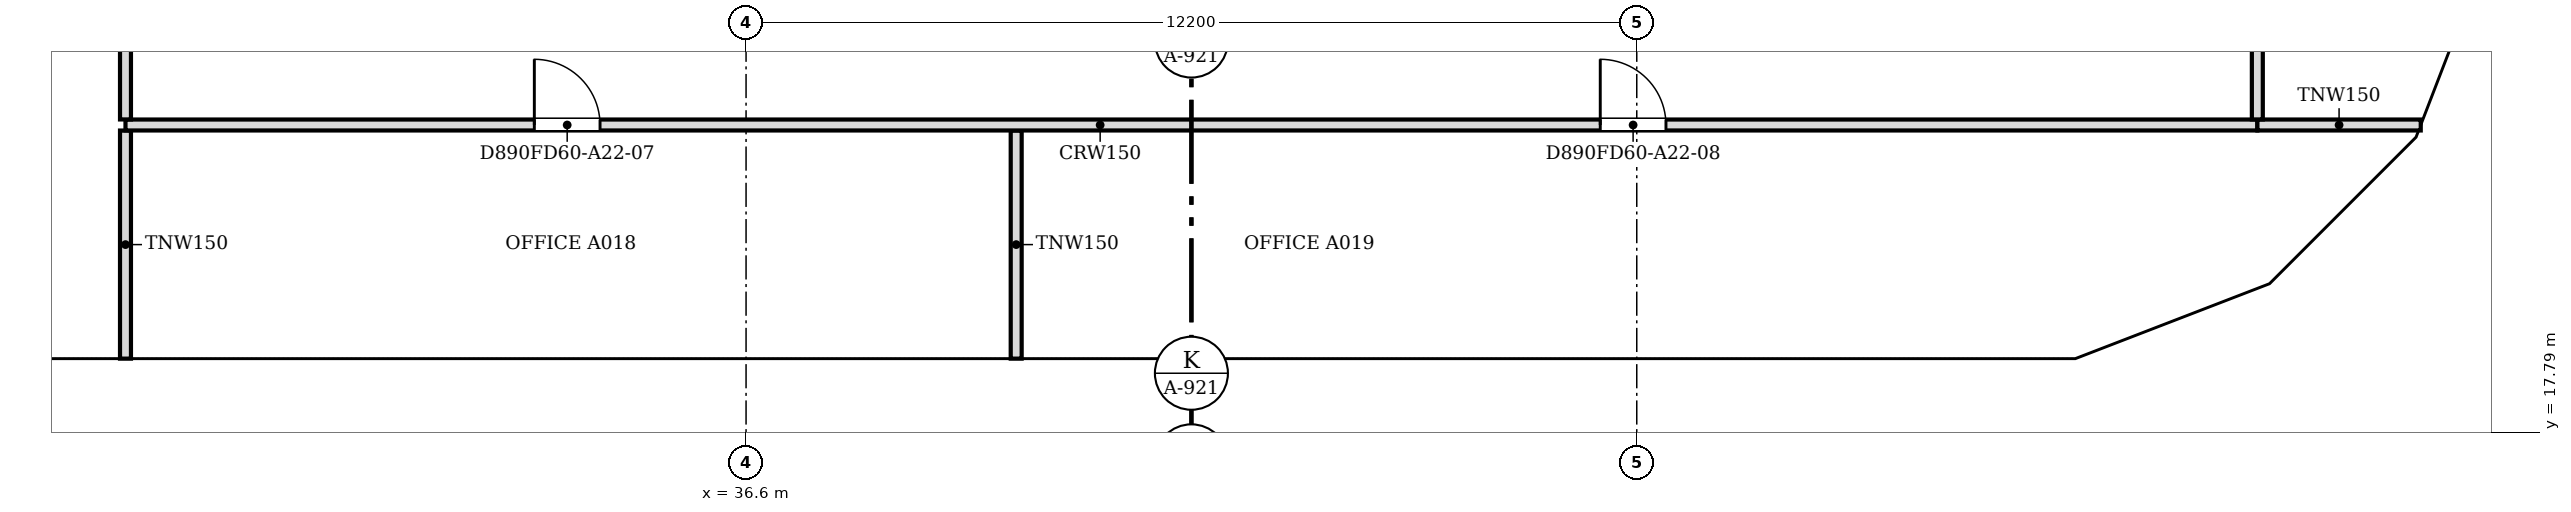
"""IFC4 building model, lengths in metres.
Left out: names, types, materials, properties, quantities, classifications, styles, units other than length and angle.
Written with IfcOpenShell. Run it as: python <this file> out.ifc"""

import sys

from ifc_helpers import new_model, si_unit, direction, frame, frame_2d, origin, place, context, subcontext, project, spatial, polyline, rectangle, outline, extrude, faceted_brep, source, transform, mapped, element, fill, save


model = new_model("IFC4")
c1 = context("Model", 3, precision=1e-05, world=origin(), true_north=direction((0.0, 1.0)))
c2 = subcontext(c1, "Body", "Model", "MODEL_VIEW")
j1 = project(units=[si_unit("LENGTHUNIT", "METRE"), si_unit("PLANEANGLEUNIT", "RADIAN")], contexts=[c1])
p1 = place(None, origin())
s1 = spatial("IfcSite", under=j1, at=p1, CompositionType="ELEMENT")
p2 = place(p1, origin())
s2 = spatial("IfcBuilding", under=s1, at=p2, CompositionType="ELEMENT")
p3 = place(p2, frame((0.0, 0.0, 255.9)))
s3 = spatial("IfcBuildingStorey", under=s2, at=p3, CompositionType="ELEMENT", Elevation=255.9)
m1 = source(origin(), c2, "Body", "SweptSolid", [
    extrude(outline(polyline([(3.05, 0.0), (6.1, 3.8), (3.05, 7.6), (0.0, 3.8), (3.05, 0.0)])), frame((0.0, 0.25, 0.0), z_axis=(0.0, -1.0, 0.0), x_axis=(1.0, 0.0, 0.0)), (0.0, 0.0, 1.0), 0.5),
])
p4 = place(p3, frame((24.4, 18.55, -3.8), z_axis=(0.0, 0.0, 1.0), x_axis=(1.0, 0.0, 0.0)))
e1 = element("IfcWall", 1, at=p4, inside=s3, PredefinedType="SOLIDWALL", context=c2, shape_type="MappedRepresentation", body=[
    mapped(m1, transform((0.0, 0.0, 0.0), scale=1.0)),
])
m2 = source(origin(), c2, "Body", "SweptSolid", [
    extrude(outline(polyline([(3.05, 0.399), (5.78, 3.8), (3.05, 7.2), (0.321, 3.8), (3.05, 0.399)])), frame((0.0, 0.26, 0.0), z_axis=(0.0, -1.0, 0.0), x_axis=(1.0, 0.0, 0.0)), (0.0, 0.0, 1.0), 0.52),
])
p5 = place(p4, origin())
e2 = element("IfcOpeningElement", 2, at=p5, cuts=e1, PredefinedType="OPENING", context=c2, shape_type="MappedRepresentation", body=[
    mapped(m2, transform((0.0, 0.0, 0.0), scale=1.0)),
])
p6 = place(p3, frame((30.5, 18.55, -3.8), z_axis=(0.0, 0.0, 1.0), x_axis=(1.0, 0.0, 0.0)))
e3 = element("IfcWall", 3, at=p6, inside=s3, PredefinedType="SOLIDWALL", context=c2, shape_type="MappedRepresentation", body=[
    mapped(m1, transform((0.0, 0.0, 0.0), scale=1.0)),
])
p7 = place(p6, origin())
e4 = element("IfcOpeningElement", 4, at=p7, cuts=e3, PredefinedType="OPENING", context=c2, shape_type="MappedRepresentation", body=[
    mapped(m2, transform((0.0, 0.0, 0.0), scale=1.0)),
])
m3 = source(origin(), c2, "Body", "Brep", [
    faceted_brep([(3.05, -0.25, 0.0), (6.1, -0.25, 3.8), (6.1, -0.25, 3.8), (3.05, -0.25, 7.6), (0.0, -0.25, 3.8), (0.0, 0.25, 3.8), (3.05, 0.25, 7.6), (6.1, 0.25, 3.8), (6.1, 0.25, 3.8), (3.05, 0.25, 0.0)], [[[0, 1, 2, 3, 4]], [[5, 6, 7, 8, 9]], [[9, 8, 1, 0]], [[7, 6, 3, 2]], [[6, 5, 4, 3]], [[5, 9, 0, 4]], [[1, 8, 7, 2]]]),
])
p8 = place(p3, frame((36.6, 18.55, -3.8), z_axis=(0.0, 0.0, 1.0), x_axis=(1.0, 0.0, 0.0)))
e5 = element("IfcWall", 5, at=p8, inside=s3, PredefinedType="SOLIDWALL", context=c2, shape_type="MappedRepresentation", body=[
    mapped(m3, transform((0.0, 0.0, 0.0), scale=1.0)),
])
p9 = place(p8, origin())
e6 = element("IfcOpeningElement", 6, at=p9, cuts=e5, PredefinedType="OPENING", context=c2, shape_type="MappedRepresentation", body=[
    mapped(m2, transform((0.0, 0.0, 0.0), scale=1.0)),
])
p10 = place(p3, frame((42.7, 18.55, -3.8), z_axis=(0.0, 0.0, 1.0), x_axis=(1.0, 0.0, 0.0)))
e7 = element("IfcWall", 7, at=p10, inside=s3, PredefinedType="SOLIDWALL", context=c2, shape_type="MappedRepresentation", body=[
    mapped(m1, transform((0.0, 0.0, 0.0), scale=1.0)),
])
p11 = place(p10, origin())
e8 = element("IfcOpeningElement", 8, at=p11, cuts=e7, PredefinedType="OPENING", context=c2, shape_type="MappedRepresentation", body=[
    mapped(m2, transform((0.0, 0.0, 0.0), scale=1.0)),
])
m4 = source(origin(), c2, "Body", "Brep", [
    faceted_brep([(3.05, -0.25, 0.0), (6.053, -0.25, 3.8), (3.05, -0.25, 7.6), (0.0, -0.25, 3.8), (0.0, 0.25, 3.8), (3.05, 0.25, 7.6), (6.007, 0.25, 3.859), (6.007, 0.25, 3.741), (3.05, 0.25, 0.0), (6.053, 0.0, 3.8)], [[[0, 1, 2, 3]], [[4, 5, 6, 7, 8]], [[8, 7, 9, 1, 0]], [[6, 5, 2, 1, 9]], [[5, 4, 3, 2]], [[4, 8, 0, 3]], [[9, 7, 6]]]),
])
p12 = place(p3, frame((48.8, 18.55, -3.8), z_axis=(0.0, 0.0, 1.0), x_axis=(1.0, 0.0, 0.0)))
e9 = element("IfcWall", 9, at=p12, inside=s3, PredefinedType="SOLIDWALL", context=c2, shape_type="MappedRepresentation", body=[
    mapped(m4, transform((0.0, 0.0, 0.0), scale=1.0)),
])
m5 = source(origin(), c2, "Body", "SweptSolid", [
    extrude(outline(polyline([(3.049, 0.401), (5.735, 3.8), (3.049, 7.199), (0.321, 3.8), (3.049, 0.401)])), frame((0.0, 0.26, 0.0), z_axis=(0.0, -1.0, 0.0), x_axis=(1.0, 0.0, 0.0)), (0.0, 0.0, 1.0), 0.52),
])
p13 = place(p12, origin())
e10 = element("IfcOpeningElement", 10, at=p13, cuts=e9, PredefinedType="OPENING", context=c2, shape_type="MappedRepresentation", body=[
    mapped(m5, transform((0.0, 0.0, 0.0), scale=1.0)),
])
m6 = source(origin(), c2, "Body", "Brep", [
    faceted_brep([(2.95, -0.25, 0.0), (3.003, -0.25, 0.068), (3.003, -0.25, 7.531), (2.95, -0.25, 7.6), (0.0, -0.25, 3.8), (0.047, 0.25, 3.86), (2.898, 0.25, 7.532), (2.898, 0.25, 0.068), (0.047, 0.25, 3.74), (2.95, 0.0, 0.0), (2.95, 0.0, 7.6), (0.0, 0.0, 3.8)], [[[0, 1, 2, 3, 4]], [[5, 6, 7, 8]], [[1, 0, 9]], [[10, 3, 2]], [[6, 5, 11, 4, 3, 10]], [[8, 7, 9, 0, 4, 11]], [[8, 11, 5]], [[1, 9, 7, 6, 10, 2]]]),
])
p14 = place(p3, frame((54.854, 18.55, -3.8), z_axis=(0.0, 0.0, 1.0), x_axis=(0.932997369089, 0.359883188373, 0.0)))
e11 = element("IfcWall", 11, at=p14, inside=s3, PredefinedType="SOLIDWALL", context=c2, shape_type="MappedRepresentation", body=[
    mapped(m6, transform((0.0, 0.0, 0.0), scale=1.0)),
])
m7 = source(origin(), c2, "Body", "SweptSolid", [
    extrude(outline(polyline([(2.75, 6.935), (0.316, 3.8), (2.75, 0.665), (2.75, 6.935)])), frame((0.0, 0.26, 0.0), z_axis=(0.0, -1.0, 0.0), x_axis=(1.0, 0.0, 0.0)), (0.0, 0.0, 1.0), 0.52),
])
p15 = place(p14, origin())
e12 = element("IfcOpeningElement", 12, at=p15, cuts=e11, PredefinedType="OPENING", context=c2, shape_type="MappedRepresentation", body=[
    mapped(m7, transform((0.0, 0.0, 0.0), scale=1.0)),
])
m8 = source(origin(), c2, "Body", "Brep", [
    faceted_brep([(0.053, -0.25, 0.0), (2.997, -0.25, 3.8), (0.053, -0.25, 7.6), (0.0, -0.25, 7.532), (0.0, -0.25, 0.068), (0.106, 0.25, 7.531), (2.944, 0.25, 3.868), (2.944, 0.25, 3.732), (0.106, 0.25, 0.068), (2.997, 0.0, 3.8), (0.053, 0.0, 0.0), (0.053, 0.0, 7.6)], [[[0, 1, 2, 3, 4]], [[5, 6, 7, 8]], [[8, 7, 9, 1, 0, 10]], [[6, 5, 11, 2, 1, 9]], [[3, 2, 11]], [[10, 0, 4]], [[8, 10, 4, 3, 11, 5]], [[9, 7, 6]]]),
])
p16 = place(p3, frame((57.569, 19.574, -3.8), z_axis=(0.0, 0.0, 1.0), x_axis=(0.707106781187, 0.707106781187, 0.0)))
e13 = element("IfcWall", 13, at=p16, inside=s3, PredefinedType="SOLIDWALL", context=c2, shape_type="MappedRepresentation", body=[
    mapped(m8, transform((0.0, 0.0, 0.0), scale=1.0)),
])
m9 = source(origin(), c2, "Body", "SweptSolid", [
    extrude(outline(polyline([(0.253, 0.666), (2.681, 3.8), (0.253, 6.934), (0.253, 0.666)])), frame((0.0, 0.26, 0.0), z_axis=(0.0, -1.0, 0.0), x_axis=(1.0, 0.0, 0.0)), (0.0, 0.0, 1.0), 0.52),
])
p17 = place(p16, origin())
e14 = element("IfcOpeningElement", 14, at=p17, cuts=e13, PredefinedType="OPENING", context=c2, shape_type="MappedRepresentation", body=[
    mapped(m9, transform((0.0, 0.0, 0.0), scale=1.0)),
])
m10 = source(origin(), c2, "Body", "Brep", [
    faceted_brep([(2.95, -0.25, 0.0), (2.997, -0.25, 0.059), (2.997, -0.25, 7.541), (2.95, -0.25, 7.6), (0.0, -0.25, 3.8), (0.053, 0.25, 3.868), (2.904, 0.25, 7.54), (2.904, 0.25, 0.06), (0.053, 0.25, 3.732), (2.95, 0.0, 0.0), (2.95, 0.0, 7.6), (0.0, 0.0, 3.8)], [[[0, 1, 2, 3, 4]], [[5, 6, 7, 8]], [[1, 0, 9]], [[10, 3, 2]], [[6, 5, 11, 4, 3, 10]], [[8, 7, 9, 0, 4, 11]], [[8, 11, 5]], [[1, 9, 7, 6, 10, 2]]]),
])
p18 = place(p3, frame((59.688, 21.694, -3.8), z_axis=(0.0, 0.0, 1.0), x_axis=(0.359972353723, 0.932962970624, 0.0)))
e15 = element("IfcWall", 15, at=p18, inside=s3, PredefinedType="SOLIDWALL", context=c2, shape_type="MappedRepresentation", body=[
    mapped(m10, transform((0.0, 0.0, 0.0), scale=1.0)),
])
p19 = place(p18, origin())
e16 = element("IfcOpeningElement", 16, at=p19, cuts=e15, PredefinedType="OPENING", context=c2, shape_type="MappedRepresentation", body=[
    mapped(m7, transform((0.0, 0.0, 0.0), scale=1.0)),
])
m11 = source(origin(), c2, "Body", "Brep", [
    faceted_brep([(3.05, -0.25, 0.0), (6.1, -0.25, 3.8), (6.1, -0.25, 3.8), (0.0, -0.25, 3.8), (0.0, 0.25, 3.8), (6.1, 0.25, 3.8), (6.1, 0.25, 3.8), (3.05, 0.25, 0.0)], [[[0, 1, 2, 3]], [[4, 5, 6, 7]], [[7, 6, 1, 0]], [[5, 4, 3, 2]], [[4, 7, 0, 3]], [[1, 6, 5, 2]]]),
])
p20 = place(p3, frame((21.35, 18.55, 0.0), z_axis=(0.0, 0.0, 1.0), x_axis=(1.0, 0.0, 0.0)))
e17 = element("IfcWall", 17, at=p20, inside=s3, PredefinedType="SOLIDWALL", context=c2, shape_type="MappedRepresentation", body=[
    mapped(m11, transform((0.0, 0.0, 0.0), scale=1.0)),
])
m12 = source(origin(), c2, "Body", "SweptSolid", [
    extrude(outline(polyline([(3.05, 0.399), (5.579, 3.55), (0.521, 3.55), (3.05, 0.399)])), frame((0.0, 0.26, 0.0), z_axis=(0.0, -1.0, 0.0), x_axis=(1.0, 0.0, 0.0)), (0.0, 0.0, 1.0), 0.52),
])
p21 = place(p20, origin())
e18 = element("IfcOpeningElement", 18, at=p21, cuts=e17, PredefinedType="OPENING", context=c2, shape_type="MappedRepresentation", body=[
    mapped(m12, transform((0.0, 0.0, 0.0), scale=1.0)),
])
m13 = source(origin(), c2, "Body", "SweptSolid", [
    extrude(outline(polyline([(3.05, 0.0), (6.1, 3.8), (0.0, 3.8), (3.05, 0.0)])), frame((0.0, 0.25, 0.0), z_axis=(0.0, -1.0, 0.0), x_axis=(1.0, 0.0, 0.0)), (0.0, 0.0, 1.0), 0.5),
])
p22 = place(p3, frame((27.45, 18.55, 0.0), z_axis=(0.0, 0.0, 1.0), x_axis=(1.0, 0.0, 0.0)))
e19 = element("IfcWall", 19, at=p22, inside=s3, PredefinedType="SOLIDWALL", context=c2, shape_type="MappedRepresentation", body=[
    mapped(m13, transform((0.0, 0.0, 0.0), scale=1.0)),
])
p23 = place(p22, origin())
e20 = element("IfcOpeningElement", 20, at=p23, cuts=e19, PredefinedType="OPENING", context=c2, shape_type="MappedRepresentation", body=[
    mapped(m12, transform((0.0, 0.0, 0.0), scale=1.0)),
])
p24 = place(p3, frame((33.55, 18.55, 0.0), z_axis=(0.0, 0.0, 1.0), x_axis=(1.0, 0.0, 0.0)))
e21 = element("IfcWall", 21, at=p24, inside=s3, PredefinedType="SOLIDWALL", context=c2, shape_type="MappedRepresentation", body=[
    mapped(m11, transform((0.0, 0.0, 0.0), scale=1.0)),
])
p25 = place(p24, origin())
e22 = element("IfcOpeningElement", 22, at=p25, cuts=e21, PredefinedType="OPENING", context=c2, shape_type="MappedRepresentation", body=[
    mapped(m12, transform((0.0, 0.0, 0.0), scale=1.0)),
])
p26 = place(p3, frame((39.65, 18.55, 0.0), z_axis=(0.0, 0.0, 1.0), x_axis=(1.0, 0.0, 0.0)))
e23 = element("IfcWall", 23, at=p26, inside=s3, PredefinedType="SOLIDWALL", context=c2, shape_type="MappedRepresentation", body=[
    mapped(m13, transform((0.0, 0.0, 0.0), scale=1.0)),
])
p27 = place(p26, origin())
e24 = element("IfcOpeningElement", 24, at=p27, cuts=e23, PredefinedType="OPENING", context=c2, shape_type="MappedRepresentation", body=[
    mapped(m12, transform((0.0, 0.0, 0.0), scale=1.0)),
])
p28 = place(p3, frame((45.75, 18.55, 0.0), z_axis=(0.0, 0.0, 1.0), x_axis=(1.0, 0.0, 0.0)))
e25 = element("IfcWall", 25, at=p28, inside=s3, PredefinedType="SOLIDWALL", context=c2, shape_type="MappedRepresentation", body=[
    mapped(m13, transform((0.0, 0.0, 0.0), scale=1.0)),
])
p29 = place(p28, origin())
e26 = element("IfcOpeningElement", 26, at=p29, cuts=e25, PredefinedType="OPENING", context=c2, shape_type="MappedRepresentation", body=[
    mapped(m12, transform((0.0, 0.0, 0.0), scale=1.0)),
])
m14 = source(origin(), c2, "Body", "Brep", [
    faceted_brep([(3.003, -0.25, 0.0), (3.05, -0.25, 0.06), (3.05, -0.25, 3.8), (0.0, -0.25, 3.8), (0.0, 0.25, 3.8), (2.957, 0.25, 3.8), (2.957, 0.25, 0.059), (3.003, 0.0, 0.0)], [[[0, 1, 2, 3]], [[4, 5, 6]], [[1, 0, 7]], [[5, 4, 3, 2]], [[4, 6, 7, 0, 3]], [[1, 7, 6, 5, 2]]]),
])
p30 = place(p3, frame((51.85, 18.55, 0.0), z_axis=(0.0, 0.0, 1.0), x_axis=(1.0, 0.0, 0.0)))
e27 = element("IfcWall", 27, at=p30, inside=s3, PredefinedType="SOLIDWALL", context=c2, shape_type="MappedRepresentation", body=[
    mapped(m14, transform((0.0, 0.0, 0.0), scale=1.0)),
])
m15 = source(origin(), c2, "Body", "SweptSolid", [
    extrude(outline(polyline([(2.803, 3.55), (0.516, 3.55), (2.803, 0.656), (2.803, 3.55)])), frame((0.0, 0.26, 0.0), z_axis=(0.0, -1.0, 0.0), x_axis=(1.0, 0.0, 0.0)), (0.0, 0.0, 1.0), 0.52),
])
p31 = place(p30, origin())
e28 = element("IfcOpeningElement", 28, at=p31, cuts=e27, PredefinedType="OPENING", context=c2, shape_type="MappedRepresentation", body=[
    mapped(m15, transform((0.0, 0.0, 0.0), scale=1.0)),
])
m16 = source(origin(), c2, "Body", "Brep", [
    faceted_brep([(0.047, -0.25, 0.0), (2.997, -0.25, 3.8), (0.0, -0.25, 3.8), (0.0, -0.25, 0.059), (0.093, 0.25, 3.8), (2.944, 0.25, 3.8), (2.944, 0.25, 3.732), (0.093, 0.25, 0.06), (2.997, 0.0, 3.8), (0.047, 0.0, 0.0)], [[[0, 1, 2, 3]], [[4, 5, 6, 7]], [[7, 6, 8, 1, 0, 9]], [[5, 4, 2, 1, 8]], [[9, 0, 3]], [[7, 9, 3, 2, 4]], [[6, 5, 8]]]),
])
p32 = place(p3, frame((54.81, 18.533, 0.0), z_axis=(0.0, 0.0, 1.0), x_axis=(0.932990326376, 0.359901446078, 0.0)))
e29 = element("IfcWall", 29, at=p32, inside=s3, PredefinedType="SOLIDWALL", context=c2, shape_type="MappedRepresentation", body=[
    mapped(m16, transform((0.0, 0.0, 0.0), scale=1.0)),
])
m17 = source(origin(), c2, "Body", "SweptSolid", [
    extrude(outline(polyline([(0.247, 0.665), (2.487, 3.55), (0.247, 3.55), (0.247, 0.665)])), frame((0.0, 0.26, 0.0), z_axis=(0.0, -1.0, 0.0), x_axis=(1.0, 0.0, 0.0)), (0.0, 0.0, 1.0), 0.52),
])
p33 = place(p32, origin())
e30 = element("IfcOpeningElement", 30, at=p33, cuts=e29, PredefinedType="OPENING", context=c2, shape_type="MappedRepresentation", body=[
    mapped(m17, transform((0.0, 0.0, 0.0), scale=1.0)),
])
m18 = source(origin(), c2, "Body", "Brep", [
    faceted_brep([(2.944, -0.25, 0.0), (2.997, -0.25, 0.068), (2.997, -0.25, 3.8), (0.0, -0.25, 3.8), (0.053, 0.25, 3.8), (2.891, 0.25, 3.8), (2.891, 0.25, 0.068), (0.053, 0.25, 3.732), (2.944, 0.0, 0.0), (0.0, 0.0, 3.8)], [[[0, 1, 2, 3]], [[4, 5, 6, 7]], [[1, 0, 8]], [[5, 4, 9, 3, 2]], [[7, 6, 8, 0, 3, 9]], [[7, 9, 4]], [[1, 8, 6, 5, 2]]]),
])
p34 = place(p3, frame((57.606, 19.612, 0.0), z_axis=(0.0, 0.0, 1.0), x_axis=(0.707106781187, 0.707106781187, 0.0)))
e31 = element("IfcWall", 31, at=p34, inside=s3, PredefinedType="SOLIDWALL", context=c2, shape_type="MappedRepresentation", body=[
    mapped(m18, transform((0.0, 0.0, 0.0), scale=1.0)),
])
m19 = source(origin(), c2, "Body", "SweptSolid", [
    extrude(outline(polyline([(2.744, 3.55), (0.51, 3.55), (2.744, 0.667), (2.744, 3.55)])), frame((0.0, 0.26, 0.0), z_axis=(0.0, -1.0, 0.0), x_axis=(1.0, 0.0, 0.0)), (0.0, 0.0, 1.0), 0.52),
])
p35 = place(p34, origin())
e32 = element("IfcOpeningElement", 32, at=p35, cuts=e31, PredefinedType="OPENING", context=c2, shape_type="MappedRepresentation", body=[
    mapped(m19, transform((0.0, 0.0, 0.0), scale=1.0)),
])
m20 = source(origin(), c2, "Body", "Brep", [
    faceted_brep([(0.053, -0.25, 0.0), (3.003, -0.25, 3.8), (0.0, -0.25, 3.8), (0.0, -0.25, 0.068), (0.106, 0.25, 3.8), (2.957, 0.25, 3.8), (2.957, 0.25, 3.74), (0.106, 0.25, 0.068), (3.003, 0.0, 3.8), (0.053, 0.0, 0.0)], [[[0, 1, 2, 3]], [[4, 5, 6, 7]], [[7, 6, 8, 1, 0, 9]], [[5, 4, 2, 1, 8]], [[9, 0, 3]], [[7, 9, 3, 2, 4]], [[6, 5, 8]]]),
])
p36 = place(p3, frame((59.669, 21.644, 0.0), z_axis=(0.0, 0.0, 1.0), x_axis=(0.35992665181, 0.932980602862, 0.0)))
e33 = element("IfcWall", 33, at=p36, inside=s3, PredefinedType="SOLIDWALL", context=c2, shape_type="MappedRepresentation", body=[
    mapped(m20, transform((0.0, 0.0, 0.0), scale=1.0)),
])
m21 = source(origin(), c2, "Body", "SweptSolid", [
    extrude(outline(polyline([(0.253, 0.665), (2.493, 3.55), (0.253, 3.55), (0.253, 0.665)])), frame((0.0, 0.26, 0.0), z_axis=(0.0, -1.0, 0.0), x_axis=(1.0, 0.0, 0.0)), (0.0, 0.0, 1.0), 0.52),
])
p37 = place(p36, origin())
e34 = element("IfcOpeningElement", 34, at=p37, cuts=e33, PredefinedType="OPENING", context=c2, shape_type="MappedRepresentation", body=[
    mapped(m21, transform((0.0, 0.0, 0.0), scale=1.0)),
])
for number, where, z_axis, x_axis in (
    (35, (28.1, 18.8, 0.0), (0.0, 0.0, 1.0), (0.0, 1.0, 0.0)),
    (36, (40.3, 18.8, 0.0), (0.0, 0.0, 1.0), (0.0, 1.0, 0.0)),
):
    element("IfcWall", number, at=place(p3, frame(where, z_axis=z_axis, x_axis=x_axis)), inside=s3, PredefinedType="PARTITIONING", context=c2, shape_type="SweptSolid", body=[
        extrude(rectangle(XDim=3.124, YDim=0.15, at=frame_2d((1.562, 0.0))), origin(), (0.0, 0.0, 1.0), 2.947),
    ])
p38 = place(p3, frame((57.3, 22.0, 0.0), z_axis=(0.0, 0.0, 1.0), x_axis=(-1.0, 0.0, 0.0)))
e37 = element("IfcWall", 37, at=p38, inside=s3, PredefinedType="PARTITIONING", context=c2, shape_type="SweptSolid", body=[
    extrude(rectangle(XDim=29.2, YDim=0.15, at=frame_2d((14.6, 0.0))), origin(), (0.0, 0.0, 1.0), 2.947),
])
m22 = source(origin(), c2, "Body", "SweptSolid", [
    extrude(rectangle(XDim=0.9, YDim=2.1, at=frame_2d((0.45, 1.05))), frame((0.0, 0.085, 0.0), z_axis=(0.0, -1.0, 0.0), x_axis=(1.0, 0.0, 0.0)), (0.0, 0.0, 1.0), 0.17),
])
p39 = place(p38, frame((22.7, 0.0, 0.0)))
e38 = element("IfcOpeningElement", 38, at=p39, cuts=e37, PredefinedType="OPENING", context=c2, shape_type="MappedRepresentation", body=[
    mapped(m22, transform((0.0, 0.0, 0.0), scale=1.0)),
])
p40 = place(p38, frame((8.1, 0.0, 0.0)))
e39 = element("IfcOpeningElement", 39, at=p40, cuts=e37, PredefinedType="OPENING", context=c2, shape_type="MappedRepresentation", body=[
    mapped(m22, transform((0.0, 0.0, 0.0), scale=1.0)),
])
p41 = place(p3, frame((57.301, 22.0, 0.0), z_axis=(0.0, 0.0, 1.0), x_axis=(1.0, 0.0, 0.0)))
e40 = element("IfcWall", 40, at=p41, inside=s3, PredefinedType="PARTITIONING", context=c2, shape_type="SweptSolid", body=[
    extrude(rectangle(XDim=2.237, YDim=0.15, at=frame_2d((1.119, 0.0))), origin(), (0.0, 0.0, 1.0), 2.947),
])
p42 = place(p3, frame((28.1, 22.076, 0.0), z_axis=(0.0, 0.0, 1.0), x_axis=(0.0, 1.0, 0.0)))
e41 = element("IfcWall", 41, at=p42, inside=s3, PredefinedType="PARTITIONING", context=c2, shape_type="SweptSolid", body=[
    extrude(rectangle(XDim=23.548, YDim=0.15, at=frame_2d((11.774, 0.0))), origin(), (0.0, 0.0, 1.0), 2.947),
])
m23 = source(origin(), c2, "Body", "SweptSolid", [
    extrude(rectangle(XDim=1.0, YDim=2.1, at=frame_2d((0.5, 1.05))), frame((0.0, 0.085, 0.0), z_axis=(0.0, -1.0, 0.0), x_axis=(1.0, 0.0, 0.0)), (0.0, 0.0, 1.0), 0.17),
])
p43 = place(p42, frame((2.5, 0.0, 0.0)))
e42 = element("IfcOpeningElement", 42, at=p43, cuts=e41, PredefinedType="OPENING", context=c2, shape_type="MappedRepresentation", body=[
    mapped(m23, transform((0.0, 0.0, 0.0), scale=1.0)),
])
p44 = place(p42, frame((18.875, 0.0, 0.0)))
e43 = element("IfcOpeningElement", 43, at=p44, cuts=e41, PredefinedType="OPENING", context=c2, shape_type="MappedRepresentation", body=[
    mapped(m22, transform((0.0, 0.0, 0.0), scale=1.0)),
])
p45 = place(p42, frame((10.124, 0.0, 0.0)))
e44 = element("IfcOpeningElement", 44, at=p45, cuts=e41, PredefinedType="OPENING", context=c2, shape_type="MappedRepresentation", body=[
    mapped(m22, transform((0.0, 0.0, 0.0), scale=1.0)),
])
p46 = place(p3, frame((57.3, 30.6, 0.0), z_axis=(0.0, 0.0, 1.0), x_axis=(0.0, -1.0, 0.0)))
e45 = element("IfcWall", 45, at=p46, inside=s3, PredefinedType="PARTITIONING", context=c2, shape_type="SweptSolid", body=[
    extrude(rectangle(XDim=8.524, YDim=0.15, at=frame_2d((4.262, 0.0))), origin(), (0.0, 0.0, 1.0), 2.947),
])
p47 = place(p46, frame((3.824, 0.0, 0.0)))
e46 = element("IfcOpeningElement", 46, at=p47, cuts=e45, PredefinedType="OPENING", context=c2, shape_type="MappedRepresentation", body=[
    mapped(m22, transform((0.0, 0.0, 0.0), scale=1.0)),
])
m24 = source(origin(), c2, "Body", "SweptSolid", [
    extrude(rectangle(XDim=0.9, YDim=2.1, at=frame_2d((0.45, 1.05))), frame((0.0, 0.025, 0.0), z_axis=(0.0, -1.0, 0.0), x_axis=(1.0, 0.0, 0.0)), (0.0, 0.0, 1.0), 0.05),
])
p48 = place(p39, origin())
e47 = element("IfcDoor", 47, at=p48, inside=s3, OperationType="SINGLE_SWING_RIGHT", PredefinedType="DOOR", context=c2, shape_type="MappedRepresentation", body=[
    mapped(m24, transform((0.0, 0.0, 0.0), scale=1.0)),
])
fill(e38, e47)
p49 = place(p40, origin())
e48 = element("IfcDoor", 48, at=p49, inside=s3, OperationType="SINGLE_SWING_RIGHT", PredefinedType="DOOR", context=c2, shape_type="MappedRepresentation", body=[
    mapped(m24, transform((0.0, 0.0, 0.0), scale=1.0)),
])
fill(e39, e48)
save(model, sys.argv[1])
